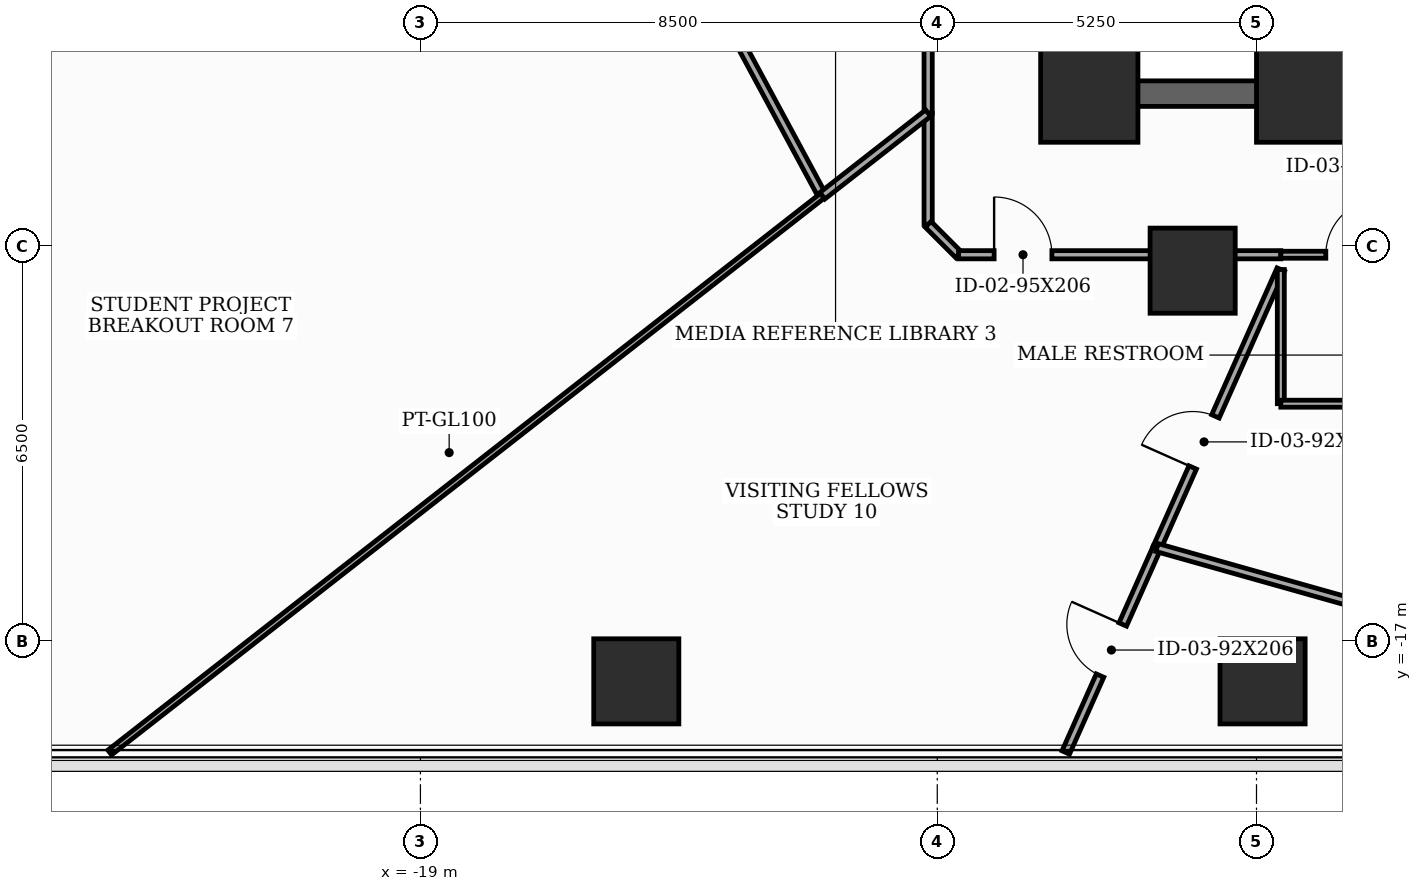
"""IFC4 building model, lengths in metres.
Left out: names, types, materials, properties, quantities, classifications, styles, units other than length and angle.
Written with IfcOpenShell. Run it as: python <this file> out.ifc"""

import sys

from ifc_helpers import new_model, si_unit, direction, frame, frame_2d, origin, origin_2d, place, context, subcontext, project, spatial, rectangle, extrude, element, fill, save


model = new_model("IFC4")
c1 = context("Model", 3, precision=1e-05, world=origin(), true_north=direction((0.0, 1.0)))
c2 = subcontext(c1, "Body", "Model", "MODEL_VIEW")
j1 = project(units=[si_unit("LENGTHUNIT", "METRE"), si_unit("PLANEANGLEUNIT", "RADIAN")], contexts=[c1])
p1 = place(None, origin())
s1 = spatial("IfcSite", under=j1, at=p1, CompositionType="ELEMENT")
p2 = place(p1, origin())
s2 = spatial("IfcBuilding", under=s1, at=p2, CompositionType="ELEMENT")
p3 = place(p2, frame((0.0, 0.0, 51.9)))
s3 = spatial("IfcBuildingStorey", under=s2, at=p3, CompositionType="ELEMENT", Elevation=51.9)
for number, where, z_axis, x_axis in (
    (1, (-8.0, -8.0, 0.0), (0.0, 0.0, 1.0), (1.0, 0.0, 0.0)),
    (2, (-4.45, -8.0, 0.0), (0.0, 0.0, 1.0), (1.0, 0.0, 0.0)),
):
    element("IfcColumn", number, at=place(p3, frame(where, z_axis=z_axis, x_axis=x_axis)), inside=s3, PredefinedType="COLUMN", context=c2, shape_type="SweptSolid", body=[
        extrude(rectangle(XDim=1.6, YDim=1.6, at=origin_2d()), origin(), (0.0, 0.0, 1.0), 3.7),
    ])
for number, where, z_axis, x_axis in (
    (3, (-6.3, -10.912, 0.0), (0.0, 0.0, 1.0), (1.0, 0.0, 0.0)),
    (4, (-15.45, -17.667, 0.0), (0.0, 0.0, 1.0), (1.0, 0.0, 0.0)),
    (5, (-5.15, -17.667, 0.0), (0.0, 0.0, 1.0), (1.0, 0.0, 0.0)),
):
    element("IfcColumn", number, at=place(p3, frame(where, z_axis=z_axis, x_axis=x_axis)), inside=s3, PredefinedType="COLUMN", context=c2, shape_type="SweptSolid", body=[
        extrude(rectangle(XDim=1.4, YDim=1.4, at=origin_2d()), origin(), (0.0, 0.0, 1.0), 3.7),
    ])
p4 = place(p3, frame((-8.0, -8.0, 0.0), z_axis=(0.0, 0.0, 1.0), x_axis=(0.0, 1.0, 0.0)))
e6 = element("IfcWall", 6, at=p4, inside=s3, PredefinedType="SHEAR", context=c2, shape_type="SweptSolid", body=[
    extrude(rectangle(XDim=16.0, YDim=0.42, at=frame_2d((8.0, 0.0))), origin(), (0.0, 0.0, 1.0), 3.5),
])
p5 = place(p4, frame((1.002, 0.0, 0.0)))
e7 = element("IfcOpeningElement", 7, at=p5, cuts=e6, PredefinedType="OPENING", context=c2, shape_type="SweptSolid", body=[
    extrude(rectangle(XDim=0.85, YDim=2.02, at=frame_2d((0.425, 1.01))), frame((0.0, 0.22, 0.0), z_axis=(0.0, -1.0, 0.0), x_axis=(1.0, 0.0, 0.0)), (0.0, 0.0, 1.0), 0.44),
])
p6 = place(p4, frame((5.35, 0.0, 0.0)))
e8 = element("IfcOpeningElement", 8, at=p6, cuts=e6, PredefinedType="OPENING", context=c2, shape_type="SweptSolid", body=[
    extrude(rectangle(XDim=1.05, YDim=2.15, at=frame_2d((0.525, 1.075))), frame((0.0, 0.22, 0.0), z_axis=(0.0, -1.0, 0.0), x_axis=(1.0, 0.0, 0.0)), (0.0, 0.0, 1.0), 0.44),
])
p7 = place(p3, frame((-8.0, -8.0, 0.0), z_axis=(0.0, 0.0, 1.0), x_axis=(1.0, 0.0, 0.0)))
e9 = element("IfcWall", 9, at=p7, inside=s3, PredefinedType="SHEAR", context=c2, shape_type="SweptSolid", body=[
    extrude(rectangle(XDim=16.0, YDim=0.42, at=frame_2d((8.0, 0.0))), origin(), (0.0, 0.0, 1.0), 3.5),
])
p8 = place(p7, frame((4.529, 0.0, 0.0)))
e10 = element("IfcOpeningElement", 10, at=p8, cuts=e9, PredefinedType="OPENING", context=c2, shape_type="SweptSolid", body=[
    extrude(rectangle(XDim=0.85, YDim=2.02, at=frame_2d((0.425, 1.01))), frame((0.0, 0.22, 0.0), z_axis=(0.0, -1.0, 0.0), x_axis=(1.0, 0.0, 0.0)), (0.0, 0.0, 1.0), 0.44),
])
p9 = place(p7, frame((6.49, 0.0, 0.0)))
e11 = element("IfcOpeningElement", 11, at=p9, cuts=e9, PredefinedType="OPENING", context=c2, shape_type="SweptSolid", body=[
    extrude(rectangle(XDim=0.85, YDim=2.02, at=frame_2d((0.425, 1.01))), frame((0.0, 0.22, 0.0), z_axis=(0.0, -1.0, 0.0), x_axis=(1.0, 0.0, 0.0)), (0.0, 0.0, 1.0), 0.44),
])
p10 = place(p7, frame((8.69, 0.0, 0.0)))
e12 = element("IfcOpeningElement", 12, at=p10, cuts=e9, PredefinedType="OPENING", context=c2, shape_type="SweptSolid", body=[
    extrude(rectangle(XDim=0.85, YDim=2.02, at=frame_2d((0.425, 1.01))), frame((0.0, 0.22, 0.0), z_axis=(0.0, -1.0, 0.0), x_axis=(1.0, 0.0, 0.0)), (0.0, 0.0, 1.0), 0.44),
])
p11 = place(p7, frame((10.621, 0.0, 0.0)))
e13 = element("IfcOpeningElement", 13, at=p11, cuts=e9, PredefinedType="OPENING", context=c2, shape_type="SweptSolid", body=[
    extrude(rectangle(XDim=0.85, YDim=2.02, at=frame_2d((0.425, 1.01))), frame((0.0, 0.22, 0.0), z_axis=(0.0, -1.0, 0.0), x_axis=(1.0, 0.0, 0.0)), (0.0, 0.0, 1.0), 0.44),
])
p12 = place(p3, frame((-4.45, -7.79, 0.0), z_axis=(0.0, 0.0, 1.0), x_axis=(0.0, 1.0, 0.0)))
e14 = element("IfcWall", 14, at=p12, inside=s3, PredefinedType="SHEAR", context=c2, shape_type="SweptSolid", body=[
    extrude(rectangle(XDim=15.58, YDim=0.3, at=frame_2d((7.79, 0.0))), origin(), (0.0, 0.0, 1.0), 3.5),
])
p13 = place(p3, frame((-10.65, -3.992, 0.0), z_axis=(0.0, 0.0, 1.0), x_axis=(0.0, -1.0, 0.0)))
e15 = element("IfcWall", 15, at=p13, inside=s3, PredefinedType="PARTITIONING", context=c2, shape_type="SweptSolid", body=[
    extrude(rectangle(XDim=4.329, YDim=0.135, at=frame_2d((2.165, 0.0))), origin(), (0.0, 0.0, 1.0), 2.785),
])
p14 = place(p3, frame((-10.65, -8.321, 0.0), z_axis=(0.0, 0.0, 1.0), x_axis=(0.0, -1.0, 0.0)))
e16 = element("IfcWall", 16, at=p14, inside=s3, PredefinedType="PARTITIONING", context=c2, shape_type="SweptSolid", body=[
    extrude(rectangle(XDim=1.829, YDim=0.135, at=frame_2d((0.915, 0.0))), origin(), (0.0, 0.0, 1.0), 3.5),
])
p15 = place(p3, frame((-10.65, -10.15, 0.0), z_axis=(0.0, 0.0, 1.0), x_axis=(0.707106781187, -0.707106781187, 0.0)))
e17 = element("IfcWall", 17, at=p15, inside=s3, PredefinedType="PARTITIONING", context=c2, shape_type="SweptSolid", body=[
    extrude(rectangle(XDim=0.707, YDim=0.135, at=frame_2d((0.354, 0.0))), origin(), (0.0, 0.0, 1.0), 3.5),
])
p16 = place(p3, frame((-10.15, -10.65, 0.0), z_axis=(0.0, 0.0, 1.0), x_axis=(1.0, 0.0, 0.0)))
e18 = element("IfcWall", 18, at=p16, inside=s3, PredefinedType="PARTITIONING", context=c2, shape_type="SweptSolid", body=[
    extrude(rectangle(XDim=5.3, YDim=0.135, at=frame_2d((2.65, 0.0))), origin(), (0.0, 0.0, 1.0), 2.085),
])
p17 = place(p16, frame((0.585, 0.0, 0.0)))
e19 = element("IfcOpeningElement", 19, at=p17, cuts=e18, PredefinedType="OPENING", context=c2, shape_type="SweptSolid", body=[
    extrude(rectangle(XDim=0.95, YDim=2.035, at=frame_2d((0.475, 1.018))), frame((0.0, 0.077, 0.0), z_axis=(0.0, -1.0, 0.0), x_axis=(1.0, 0.0, 0.0)), (0.0, 0.0, 1.0), 0.155),
])
p18 = place(p3, frame((-4.85, -10.65, 0.0), z_axis=(0.0, 0.0, 1.0), x_axis=(1.0, 0.0, 0.0)))
e20 = element("IfcWall", 20, at=p18, inside=s3, PredefinedType="PARTITIONING", context=c2, shape_type="SweptSolid", body=[
    extrude(rectangle(XDim=2.4, YDim=0.115, at=frame_2d((1.2, 0.0))), origin(), (0.0, 0.0, 1.0), 3.5),
])
p19 = place(p18, frame((0.74, 0.0, 0.0)))
e21 = element("IfcOpeningElement", 21, at=p19, cuts=e20, PredefinedType="OPENING", context=c2, shape_type="SweptSolid", body=[
    extrude(rectangle(XDim=0.92, YDim=2.1, at=frame_2d((0.46, 1.05))), frame((0.0, 0.067, 0.0), z_axis=(0.0, -1.0, 0.0), x_axis=(1.0, 0.0, 0.0)), (0.0, 0.0, 1.0), 0.135),
])
p20 = place(p3, frame((-14.851, -5.118, 0.0), z_axis=(0.0, 0.0, 1.0), x_axis=(0.474543506137, -0.880232049395, 0.0)))
e22 = element("IfcWall", 22, at=p20, inside=s3, PredefinedType="PARTITIONING", context=c2, shape_type="SweptSolid", body=[
    extrude(rectangle(XDim=5.184, YDim=0.135, at=frame_2d((2.592, 0.0))), origin(), (0.0, 0.0, 1.0), 2.085),
])
p21 = place(p3, frame((-12.391, -9.681, 0.0), z_axis=(0.0, 0.0, 1.0), x_axis=(0.788124883644, 0.615515367624, 0.0)))
e23 = element("IfcWall", 23, at=p21, inside=s3, PredefinedType="PARTITIONING", context=c2, shape_type="SweptSolid", body=[
    extrude(rectangle(XDim=2.209, YDim=0.135, at=frame_2d((1.104, 0.0))), origin(), (0.0, 0.0, 1.0), 3.5),
])
p22 = place(p3, frame((-24.11, -18.837, 0.0), z_axis=(0.0, 0.0, 1.0), x_axis=(0.788000479848, 0.615674624911, 0.0)))
e24 = element("IfcWall", 24, at=p22, inside=s3, PredefinedType="MOVABLE", context=c2, shape_type="SweptSolid", body=[
    extrude(rectangle(XDim=14.872, YDim=0.1, at=frame_2d((7.436, 0.0))), origin(), (0.0, 0.0, 1.0), 2.085),
])
p23 = place(p3, frame((-8.387, -18.837, 0.0), z_axis=(0.0, 0.0, 1.0), x_axis=(0.406721597958, 0.913552156012, 0.0)))
e25 = element("IfcWall", 25, at=p23, inside=s3, PredefinedType="PARTITIONING", context=c2, shape_type="SweptSolid", body=[
    extrude(rectangle(XDim=3.69, YDim=0.135, at=frame_2d((1.845, 0.0))), origin(), (0.0, 0.0, 1.0), 2.085),
])
p24 = place(p23, frame((1.385, 0.0, 0.0)))
e26 = element("IfcOpeningElement", 26, at=p24, cuts=e25, PredefinedType="OPENING", context=c2, shape_type="SweptSolid", body=[
    extrude(rectangle(XDim=0.92, YDim=2.035, at=frame_2d((0.46, 1.018))), frame((0.0, 0.077, 0.0), z_axis=(0.0, -1.0, 0.0), x_axis=(1.0, 0.0, 0.0)), (0.0, 0.0, 1.0), 0.155),
])
p25 = place(p3, frame((-6.886, -15.466, 0.0), z_axis=(0.0, 0.0, 1.0), x_axis=(0.406713095633, 0.913555941276, 0.0)))
e27 = element("IfcWall", 27, at=p25, inside=s3, PredefinedType="PARTITIONING", context=c2, shape_type="SweptSolid", body=[
    extrude(rectangle(XDim=5.006, YDim=0.135, at=frame_2d((2.503, 0.0))), origin(), (0.0, 0.0, 1.0), 2.085),
])
p26 = place(p25, frame((1.442, 0.0, 0.0)))
e28 = element("IfcOpeningElement", 28, at=p26, cuts=e27, PredefinedType="OPENING", context=c2, shape_type="SweptSolid", body=[
    extrude(rectangle(XDim=0.92, YDim=2.035, at=frame_2d((0.46, 1.018))), frame((0.0, 0.077, 0.0), z_axis=(0.0, -1.0, 0.0), x_axis=(1.0, 0.0, 0.0)), (0.0, 0.0, 1.0), 0.155),
])
p27 = place(p3, frame((-4.85, -10.893, 0.0), z_axis=(0.0, 0.0, 1.0), x_axis=(0.0, -1.0, 0.0)))
e29 = element("IfcWall", 29, at=p27, inside=s3, PredefinedType="PARTITIONING", context=c2, shape_type="SweptSolid", body=[
    extrude(rectangle(XDim=2.207, YDim=0.115, at=frame_2d((1.104, 0.0))), origin(), (0.0, 0.0, 1.0), 2.085),
])
p28 = place(p3, frame((-4.85, -13.1, 0.0), z_axis=(0.0, 0.0, 1.0), x_axis=(1.0, 0.0, 0.0)))
e30 = element("IfcWall", 30, at=p28, inside=s3, PredefinedType="PARTITIONING", context=c2, shape_type="SweptSolid", body=[
    extrude(rectangle(XDim=2.4, YDim=0.115, at=frame_2d((1.2, 0.0))), origin(), (0.0, 0.0, 1.0), 2.085),
])
p29 = place(p3, frame((-1.777, -16.907, 0.0), z_axis=(0.0, 0.0, 1.0), x_axis=(-0.962452140865, 0.271451425757, 0.0)))
e31 = element("IfcWall", 31, at=p29, inside=s3, PredefinedType="PARTITIONING", context=c2, shape_type="SweptSolid", body=[
    extrude(rectangle(XDim=5.308, YDim=0.135, at=frame_2d((2.654, 0.0))), origin(), (0.0, 0.0, 1.0), 2.085),
])
p30 = place(p17, origin())
e32 = element("IfcDoor", 32, at=p30, inside=s3, OperationType="SINGLE_SWING_LEFT", PredefinedType="DOOR", context=c2, shape_type="SweptSolid", body=[
    extrude(rectangle(XDim=0.95, YDim=2.035, at=frame_2d((0.475, 1.018))), frame((0.0, 0.025, 0.0), z_axis=(0.0, -1.0, 0.0), x_axis=(1.0, 0.0, 0.0)), (0.0, 0.0, 1.0), 0.05),
])
fill(e19, e32)
p31 = place(p19, origin())
e33 = element("IfcDoor", 33, at=p31, inside=s3, OperationType="SINGLE_SWING_RIGHT", PredefinedType="DOOR", context=c2, shape_type="SweptSolid", body=[
    extrude(rectangle(XDim=0.92, YDim=2.1, at=frame_2d((0.46, 1.05))), frame((0.0, 0.025, 0.0), z_axis=(0.0, -1.0, 0.0), x_axis=(1.0, 0.0, 0.0)), (0.0, 0.0, 1.0), 0.05),
])
fill(e21, e33)
p32 = place(p24, origin())
e34 = element("IfcDoor", 34, at=p32, inside=s3, OperationType="SINGLE_SWING_RIGHT", PredefinedType="DOOR", context=c2, shape_type="SweptSolid", body=[
    extrude(rectangle(XDim=0.92, YDim=2.035, at=frame_2d((0.46, 1.018))), frame((0.0, 0.025, 0.0), z_axis=(0.0, -1.0, 0.0), x_axis=(1.0, 0.0, 0.0)), (0.0, 0.0, 1.0), 0.05),
])
fill(e26, e34)
p33 = place(p26, origin())
e35 = element("IfcDoor", 35, at=p33, inside=s3, OperationType="SINGLE_SWING_LEFT", PredefinedType="DOOR", context=c2, shape_type="SweptSolid", body=[
    extrude(rectangle(XDim=0.92, YDim=2.035, at=frame_2d((0.46, 1.018))), frame((0.0, 0.025, 0.0), z_axis=(0.0, -1.0, 0.0), x_axis=(1.0, 0.0, 0.0)), (0.0, 0.0, 1.0), 0.05),
])
fill(e28, e35)
save(model, sys.argv[1])
